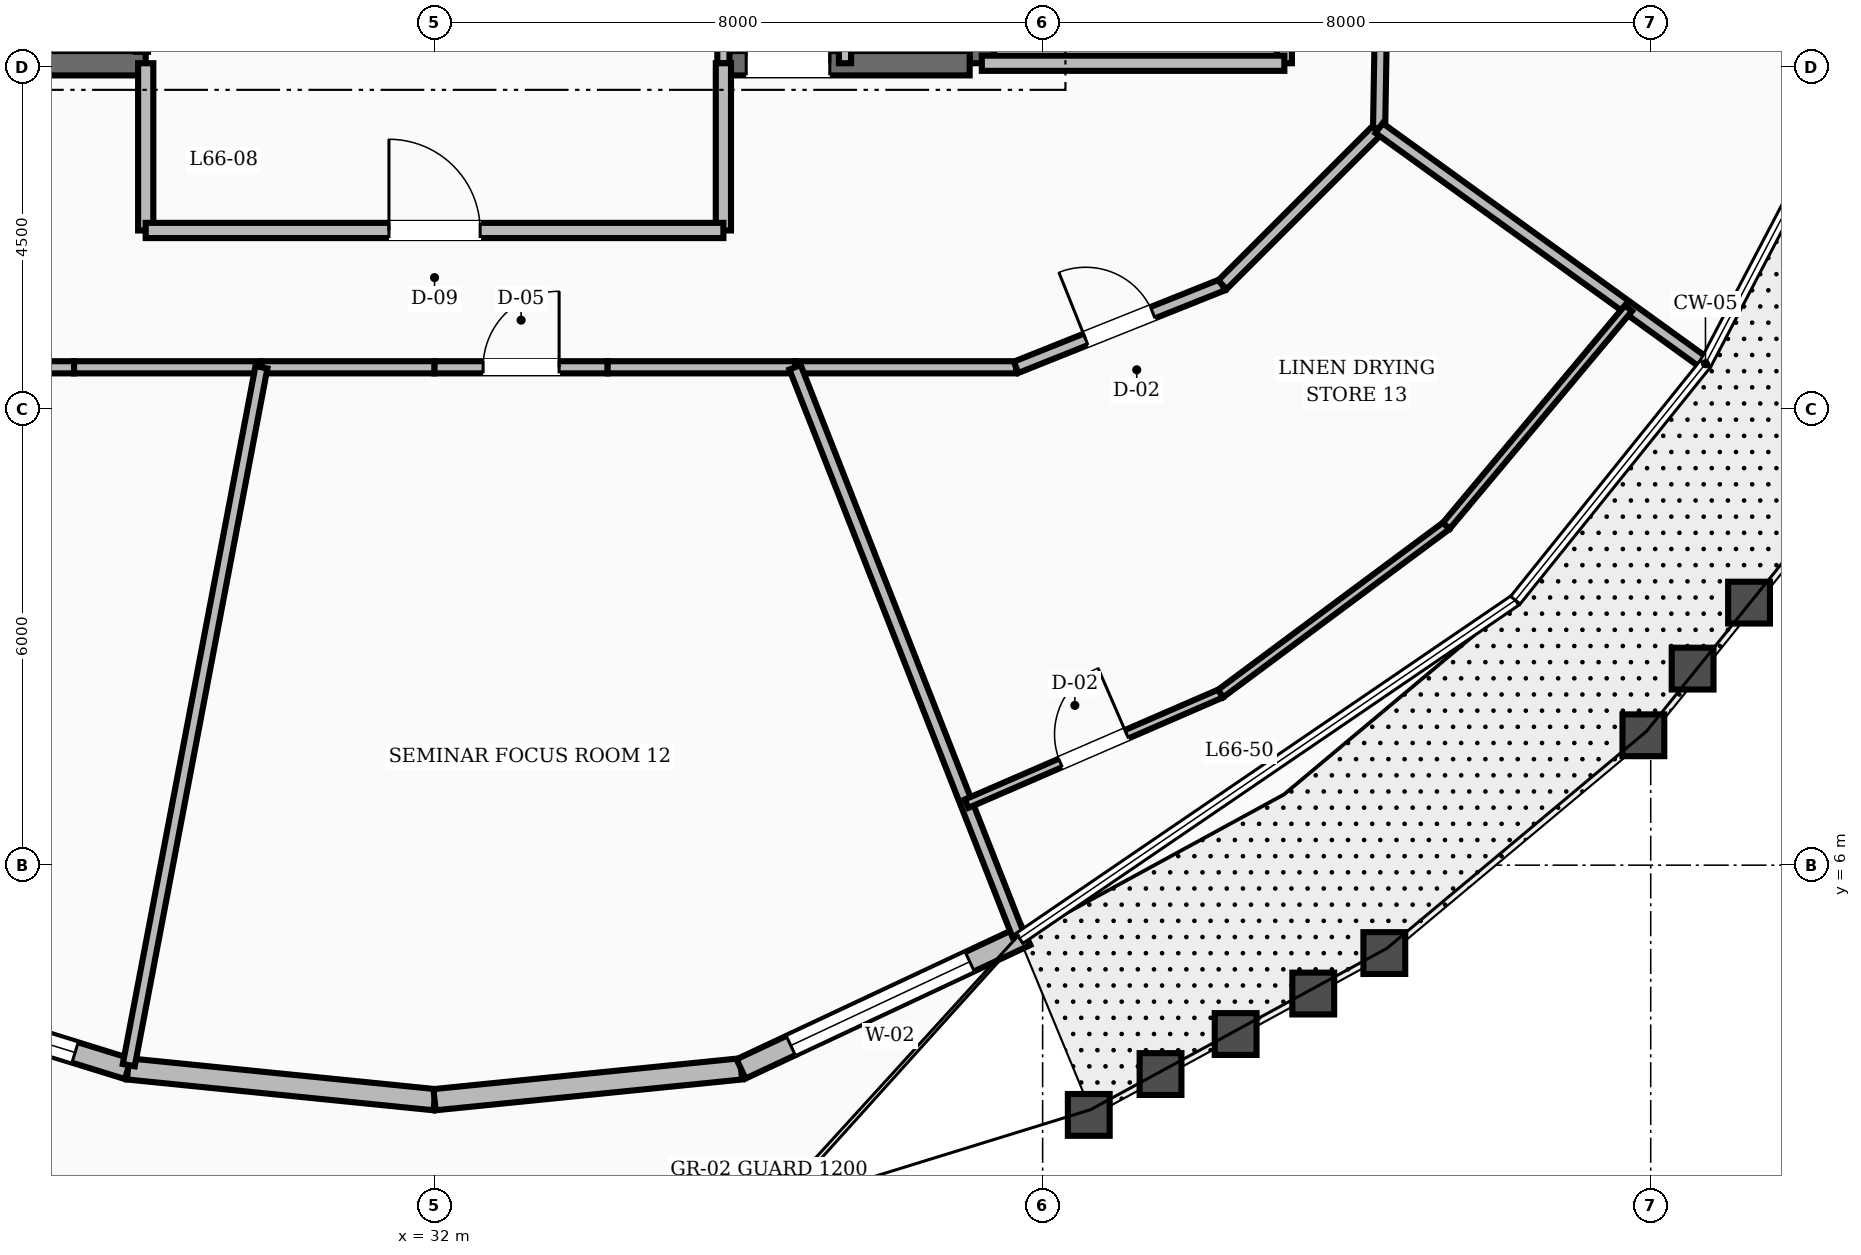
"""IFC4 building model, lengths in metres.
Left out: names, types, materials, properties, quantities, classifications, styles, units other than length and angle.
Written with IfcOpenShell. Run it as: python <this file> out.ifc"""

import sys

from ifc_helpers import new_model, si_unit, direction, frame, frame_2d, origin, place, context, subcontext, project, spatial, rectangle, extrude, element, fill, save


model = new_model("IFC4")
c1 = context("Model", 3, precision=1e-05, world=origin(), true_north=direction((0.0, 1.0)))
c2 = subcontext(c1, "Body", "Model", "MODEL_VIEW")
j1 = project(units=[si_unit("LENGTHUNIT", "METRE"), si_unit("PLANEANGLEUNIT", "RADIAN")], contexts=[c1])
p1 = place(None, origin())
s1 = spatial("IfcSite", under=j1, at=p1, CompositionType="ELEMENT")
p2 = place(p1, origin())
s2 = spatial("IfcBuilding", under=s1, at=p2, CompositionType="ELEMENT")
p3 = place(p2, frame((0.0, 0.0, 254.4)))
s3 = spatial("IfcBuildingStorey", under=s2, at=p3, CompositionType="ELEMENT", Elevation=254.4)
p4 = place(p3, frame((39.2, 16.55, 0.0), z_axis=(0.0, 0.0, 1.0), x_axis=(0.0, 1.0, 0.0)))
e1 = element("IfcWall", 1, at=p4, inside=s3, PredefinedType="SHEAR", context=c2, shape_type="SweptSolid", body=[
    extrude(rectangle(XDim=6.3, YDim=0.32, at=frame_2d((3.15, 0.0))), origin(), (0.0, 0.0, 1.0), 3.6),
])
p5 = place(p3, frame((24.96, 16.55, 0.0), z_axis=(0.0, 0.0, 1.0), x_axis=(1.0, 0.0, 0.0)))
e2 = element("IfcWall", 2, at=p5, inside=s3, PredefinedType="SHEAR", context=c2, shape_type="SweptSolid", body=[
    extrude(rectangle(XDim=3.24, YDim=0.32, at=frame_2d((1.62, 0.0))), origin(), (0.0, 0.0, 1.0), 3.6),
])
p6 = place(p3, frame((35.8, 16.55, 0.0), z_axis=(0.0, 0.0, 1.0), x_axis=(1.0, 0.0, 0.0)))
e3 = element("IfcWall", 3, at=p6, inside=s3, PredefinedType="SHEAR", context=c2, shape_type="SweptSolid", body=[
    extrude(rectangle(XDim=3.24, YDim=0.32, at=frame_2d((1.62, 0.0))), origin(), (0.0, 0.0, 1.0), 3.6),
])
p7 = place(p6, frame((0.3, 0.0, 0.0)))
e4 = element("IfcOpeningElement", 4, at=p7, cuts=e3, PredefinedType="OPENING", context=c2, shape_type="SweptSolid", body=[
    extrude(rectangle(XDim=1.1, YDim=2.1, at=frame_2d((0.55, 1.05))), frame((0.0, 0.17, 0.0), z_axis=(0.0, -1.0, 0.0), x_axis=(1.0, 0.0, 0.0)), (0.0, 0.0, 1.0), 0.34),
])
p8 = place(p3, frame((24.09, 4.52, 0.0), z_axis=(0.0, 0.0, 1.0), x_axis=(0.955300452464, -0.295636678243, 0.0)))
e5 = element("IfcWall", 5, at=p8, inside=s3, PredefinedType="STANDARD", context=c2, shape_type="SweptSolid", body=[
    extrude(rectangle(XDim=4.059, YDim=0.28, at=frame_2d((2.029, 0.0))), origin(), (0.0, 0.0, 1.0), 2.88),
])
p9 = place(p8, frame((0.729, 0.0, 0.8)))
e6 = element("IfcOpeningElement", 6, at=p9, cuts=e5, PredefinedType="OPENING", context=c2, shape_type="SweptSolid", body=[
    extrude(rectangle(XDim=2.6, YDim=1.65, at=frame_2d((1.3, 0.825))), frame((0.0, 0.15, 0.0), z_axis=(0.0, -1.0, 0.0), x_axis=(1.0, 0.0, 0.0)), (0.0, 0.0, 1.0), 0.3),
])
for number, where, z_axis, x_axis in (
    (7, (27.968, 3.32, 0.0), (0.0, 0.0, 1.0), (0.995, -0.1, 0.0)),
    (8, (32.0, 2.915, 0.0), (0.0, 0.0, 1.0), (0.995, 0.1, 0.0)),
):
    element("IfcWall", number, at=place(p3, frame(where, z_axis=z_axis, x_axis=x_axis)), inside=s3, PredefinedType="STANDARD", context=c2, shape_type="SweptSolid", body=[
        extrude(rectangle(XDim=4.053, YDim=0.28, at=frame_2d((2.026, 0.0))), origin(), (0.0, 0.0, 1.0), 2.88),
    ])
p10 = place(p3, frame((36.032, 3.32, 0.0), z_axis=(0.0, 0.0, 1.0), x_axis=(0.905435549798, 0.424483763131, 0.0)))
e9 = element("IfcWall", 9, at=p10, inside=s3, PredefinedType="STANDARD", context=c2, shape_type="SweptSolid", body=[
    extrude(rectangle(XDim=4.138, YDim=0.28, at=frame_2d((2.069, 0.0))), origin(), (0.0, 0.0, 1.0), 2.88),
])
p11 = place(p10, frame((0.723, 0.0, 0.8)))
e10 = element("IfcOpeningElement", 10, at=p11, cuts=e9, PredefinedType="OPENING", context=c2, shape_type="SweptSolid", body=[
    extrude(rectangle(XDim=2.6, YDim=1.65, at=frame_2d((1.3, 0.825))), frame((0.0, 0.15, 0.0), z_axis=(0.0, -1.0, 0.0), x_axis=(1.0, 0.0, 0.0)), (0.0, 0.0, 1.0), 0.3),
])
p12 = place(p3, frame((43.18, 16.55, 0.0), z_axis=(0.0, 0.0, 1.0), x_axis=(0.0, 1.0, 0.0)))
e11 = element("IfcWall", 11, at=p12, inside=s3, PredefinedType="SOLIDWALL", context=c2, shape_type="SweptSolid", body=[
    extrude(rectangle(XDim=2.73, YDim=0.2, at=frame_2d((1.365, 0.0))), origin(), (0.0, 0.0, 1.0), 2.87),
])
p13 = place(p12, frame((0.89, 0.0, 0.0)))
e12 = element("IfcOpeningElement", 12, at=p13, cuts=e11, PredefinedType="OPENING", context=c2, shape_type="SweptSolid", body=[
    extrude(rectangle(XDim=0.95, YDim=2.1, at=frame_2d((0.475, 1.05))), frame((0.0, 0.11, 0.0), z_axis=(0.0, -1.0, 0.0), x_axis=(1.0, 0.0, 0.0)), (0.0, 0.0, 1.0), 0.22),
])
p14 = place(p3, frame((39.2, 16.55, 0.0), z_axis=(0.0, 0.0, 1.0), x_axis=(1.0, 0.0, 0.0)))
e13 = element("IfcWall", 13, at=p14, inside=s3, PredefinedType="SOLIDWALL", context=c2, shape_type="SweptSolid", body=[
    extrude(rectangle(XDim=3.98, YDim=0.2, at=frame_2d((1.99, 0.0))), origin(), (0.0, 0.0, 1.0), 2.87),
])
p15 = place(p3, frame((35.8, 16.55, 0.0), z_axis=(0.0, 0.0, 1.0), x_axis=(0.0, 1.0, 0.0)))
e14 = element("IfcWall", 14, at=p15, inside=s3, PredefinedType="SOLIDWALL", context=c2, shape_type="SweptSolid", body=[
    extrude(rectangle(XDim=3.3, YDim=0.16, at=frame_2d((1.65, 0.0))), origin(), (0.0, 0.0, 1.0), 2.87),
])
p16 = place(p3, frame((37.4, 16.55, 0.0), z_axis=(0.0, 0.0, 1.0), x_axis=(0.0, 1.0, 0.0)))
e15 = element("IfcWall", 15, at=p16, inside=s3, PredefinedType="SOLIDWALL", context=c2, shape_type="SweptSolid", body=[
    extrude(rectangle(XDim=1.75, YDim=0.16, at=frame_2d((0.875, 0.0))), origin(), (0.0, 0.0, 1.0), 2.87),
])
for number, where, z_axis, x_axis in (
    (16, (28.2, 14.35, 0.0), (0.0, 0.0, 1.0), (0.0, 1.0, 0.0)),
    (17, (35.8, 14.35, 0.0), (0.0, 0.0, 1.0), (0.0, 1.0, 0.0)),
):
    element("IfcWall", number, at=place(p3, frame(where, z_axis=z_axis, x_axis=x_axis)), inside=s3, PredefinedType="SOLIDWALL", context=c2, shape_type="SweptSolid", body=[
        extrude(rectangle(XDim=2.2, YDim=0.2, at=frame_2d((1.1, 0.0))), origin(), (0.0, 0.0, 1.0), 2.87),
    ])
p17 = place(p3, frame((28.2, 14.35, 0.0), z_axis=(0.0, 0.0, 1.0), x_axis=(1.0, 0.0, 0.0)))
e18 = element("IfcWall", 18, at=p17, inside=s3, PredefinedType="SOLIDWALL", context=c2, shape_type="SweptSolid", body=[
    extrude(rectangle(XDim=7.6, YDim=0.2, at=frame_2d((3.8, 0.0))), origin(), (0.0, 0.0, 1.0), 2.87),
])
p18 = place(p17, frame((3.2, 0.0, 0.0)))
e19 = element("IfcOpeningElement", 19, at=p18, cuts=e18, PredefinedType="OPENING", context=c2, shape_type="SweptSolid", body=[
    extrude(rectangle(XDim=1.2, YDim=2.1, at=frame_2d((0.6, 1.05))), frame((0.0, 0.11, 0.0), z_axis=(0.0, -1.0, 0.0), x_axis=(1.0, 0.0, 0.0)), (0.0, 0.0, 1.0), 0.22),
])
p19 = place(p3, frame((24.349, 12.55, 0.0), z_axis=(0.0, 0.0, 1.0), x_axis=(1.0, 0.0, 0.0)))
e20 = element("IfcWall", 20, at=p19, inside=s3, PredefinedType="SOLIDWALL", context=c2, shape_type="SweptSolid", body=[
    extrude(rectangle(XDim=2.908, YDim=0.16, at=frame_2d((1.454, 0.0))), origin(), (0.0, 0.0, 1.0), 2.87),
])
p20 = place(p19, frame((0.954, 0.0, 0.0)))
e21 = element("IfcOpeningElement", 21, at=p20, cuts=e20, PredefinedType="OPENING", context=c2, shape_type="SweptSolid", body=[
    extrude(rectangle(XDim=1.0, YDim=2.1, at=frame_2d((0.5, 1.05))), frame((0.0, 0.09, 0.0), z_axis=(0.0, -1.0, 0.0), x_axis=(1.0, 0.0, 0.0)), (0.0, 0.0, 1.0), 0.18),
])
p21 = place(p3, frame((27.257, 12.55, 0.0), z_axis=(0.0, 0.0, 1.0), x_axis=(1.0, 0.0, 0.0)))
e22 = element("IfcWall", 22, at=p21, inside=s3, PredefinedType="SOLIDWALL", context=c2, shape_type="SweptSolid", body=[
    extrude(rectangle(XDim=2.465, YDim=0.16, at=frame_2d((1.232, 0.0))), origin(), (0.0, 0.0, 1.0), 2.87),
])
p22 = place(p3, frame((29.722, 12.55, 0.0), z_axis=(0.0, 0.0, 1.0), x_axis=(1.0, 0.0, 0.0)))
e23 = element("IfcWall", 23, at=p22, inside=s3, PredefinedType="SOLIDWALL", context=c2, shape_type="SweptSolid", body=[
    extrude(rectangle(XDim=2.278, YDim=0.16, at=frame_2d((1.139, 0.0))), origin(), (0.0, 0.0, 1.0), 2.87),
])
p23 = place(p3, frame((32.0, 12.55, 0.0), z_axis=(0.0, 0.0, 1.0), x_axis=(1.0, 0.0, 0.0)))
e24 = element("IfcWall", 24, at=p23, inside=s3, PredefinedType="SOLIDWALL", context=c2, shape_type="SweptSolid", body=[
    extrude(rectangle(XDim=2.278, YDim=0.16, at=frame_2d((1.139, 0.0))), origin(), (0.0, 0.0, 1.0), 2.87),
])
p24 = place(p23, frame((0.639, 0.0, 0.0)))
e25 = element("IfcOpeningElement", 25, at=p24, cuts=e24, PredefinedType="OPENING", context=c2, shape_type="SweptSolid", body=[
    extrude(rectangle(XDim=1.0, YDim=2.1, at=frame_2d((0.5, 1.05))), frame((0.0, 0.09, 0.0), z_axis=(0.0, -1.0, 0.0), x_axis=(1.0, 0.0, 0.0)), (0.0, 0.0, 1.0), 0.18),
])
p25 = place(p3, frame((34.278, 12.55, 0.0), z_axis=(0.0, 0.0, 1.0), x_axis=(1.0, 0.0, 0.0)))
e26 = element("IfcWall", 26, at=p25, inside=s3, PredefinedType="SOLIDWALL", context=c2, shape_type="SweptSolid", body=[
    extrude(rectangle(XDim=2.465, YDim=0.16, at=frame_2d((1.232, 0.0))), origin(), (0.0, 0.0, 1.0), 2.87),
])
p26 = place(p3, frame((36.743, 12.55, 0.0), z_axis=(0.0, 0.0, 1.0), x_axis=(1.0, 0.0, 0.0)))
e27 = element("IfcWall", 27, at=p26, inside=s3, PredefinedType="SOLIDWALL", context=c2, shape_type="SweptSolid", body=[
    extrude(rectangle(XDim=2.908, YDim=0.16, at=frame_2d((1.454, 0.0))), origin(), (0.0, 0.0, 1.0), 2.87),
])
p27 = place(p3, frame((39.651, 12.55, 0.0), z_axis=(0.0, 0.0, 1.0), x_axis=(0.92856882165, 0.371160266542, 0.0)))
e28 = element("IfcWall", 28, at=p27, inside=s3, PredefinedType="SOLIDWALL", context=c2, shape_type="SweptSolid", body=[
    extrude(rectangle(XDim=2.923, YDim=0.16, at=frame_2d((1.461, 0.0))), origin(), (0.0, 0.0, 1.0), 2.87),
])
p28 = place(p27, frame((0.987, 0.0, 0.0)))
e29 = element("IfcOpeningElement", 29, at=p28, cuts=e28, PredefinedType="OPENING", context=c2, shape_type="SweptSolid", body=[
    extrude(rectangle(XDim=0.95, YDim=2.1, at=frame_2d((0.475, 1.05))), frame((0.0, 0.09, 0.0), z_axis=(0.0, -1.0, 0.0), x_axis=(1.0, 0.0, 0.0)), (0.0, 0.0, 1.0), 0.18),
])
p29 = place(p3, frame((42.365, 13.635, 0.0), z_axis=(0.0, 0.0, 1.0), x_axis=(0.707106781187, 0.707106781187, 0.0)))
e30 = element("IfcWall", 30, at=p29, inside=s3, PredefinedType="SOLIDWALL", context=c2, shape_type="SweptSolid", body=[
    extrude(rectangle(XDim=2.916, YDim=0.16, at=frame_2d((1.458, 0.0))), origin(), (0.0, 0.0, 1.0), 2.87),
])
p30 = place(p3, frame((44.427, 15.697, 0.0), z_axis=(0.0, 0.0, 1.0), x_axis=(0.016981035134, 0.999855811828, 0.0)))
e31 = element("IfcWall", 31, at=p30, inside=s3, PredefinedType="SOLIDWALL", context=c2, shape_type="SweptSolid", body=[
    extrude(rectangle(XDim=3.134, YDim=0.16, at=frame_2d((1.567, 0.0))), origin(), (0.0, 0.0, 1.0), 2.87),
])
p31 = place(p3, frame((44.427, 15.697, 0.0), z_axis=(0.0, 0.0, 1.0), x_axis=(0.810763897191, -0.585373302271, 0.0)))
e32 = element("IfcWall", 32, at=p31, inside=s3, PredefinedType="SOLIDWALL", context=c2, shape_type="SweptSolid", body=[
    extrude(rectangle(XDim=5.246, YDim=0.16, at=frame_2d((2.623, 0.0))), origin(), (0.0, 0.0, 1.0), 2.87),
])
p32 = place(p3, frame((29.722, 12.55, 0.0), z_axis=(0.0, 0.0, 1.0), x_axis=(-0.186783181111, -0.982401162079, 0.0)))
e33 = element("IfcWall", 33, at=p32, inside=s3, PredefinedType="SOLIDWALL", context=c2, shape_type="SweptSolid", body=[
    extrude(rectangle(XDim=9.346, YDim=0.16, at=frame_2d((4.673, 0.0))), origin(), (0.0, 0.0, 1.0), 2.87),
])
p33 = place(p3, frame((36.743, 12.55, 0.0), z_axis=(0.0, 0.0, 1.0), x_axis=(0.365790774428, -0.930697109345, 0.0)))
e34 = element("IfcWall", 34, at=p33, inside=s3, PredefinedType="SOLIDWALL", context=c2, shape_type="SweptSolid", body=[
    extrude(rectangle(XDim=8.022, YDim=0.16, at=frame_2d((4.011, 0.0))), origin(), (0.0, 0.0, 1.0), 2.87),
])
p34 = place(p3, frame((38.999, 6.809, 0.0), z_axis=(0.0, 0.0, 1.0), x_axis=(0.917427639105, 0.397902660215, 0.0)))
e35 = element("IfcWall", 35, at=p34, inside=s3, PredefinedType="PARTITIONING", context=c2, shape_type="SweptSolid", body=[
    extrude(rectangle(XDim=3.643, YDim=0.12, at=frame_2d((1.822, 0.0))), origin(), (0.0, 0.0, 1.0), 2.87),
])
p35 = place(p34, frame((1.347, 0.0, 0.0)))
e36 = element("IfcOpeningElement", 36, at=p35, cuts=e35, PredefinedType="OPENING", context=c2, shape_type="SweptSolid", body=[
    extrude(rectangle(XDim=0.95, YDim=2.1, at=frame_2d((0.475, 1.05))), frame((0.0, 0.07, 0.0), z_axis=(0.0, -1.0, 0.0), x_axis=(1.0, 0.0, 0.0)), (0.0, 0.0, 1.0), 0.14),
])
p36 = place(p3, frame((42.342, 8.258, 0.0), z_axis=(0.0, 0.0, 1.0), x_axis=(0.802621959604, 0.596488046788, 0.0)))
e37 = element("IfcWall", 37, at=p36, inside=s3, PredefinedType="PARTITIONING", context=c2, shape_type="SweptSolid", body=[
    extrude(rectangle(XDim=3.699, YDim=0.12, at=frame_2d((1.849, 0.0))), origin(), (0.0, 0.0, 1.0), 2.87),
])
p37 = place(p3, frame((45.311, 10.465, 0.0), z_axis=(0.0, 0.0, 1.0), x_axis=(0.642015314971, 0.766691812492, 0.0)))
e38 = element("IfcWall", 38, at=p37, inside=s3, PredefinedType="PARTITIONING", context=c2, shape_type="SweptSolid", body=[
    extrude(rectangle(XDim=3.734, YDim=0.12, at=frame_2d((1.867, 0.0))), origin(), (0.0, 0.0, 1.0), 2.87),
])
p38 = place(p9, origin())
e39 = element("IfcWindow", 39, at=p38, inside=s3, PartitioningType="SINGLE_PANEL", PredefinedType="WINDOW", context=c2, shape_type="SweptSolid", body=[
    extrude(rectangle(XDim=2.6, YDim=1.65, at=frame_2d((1.3, 0.825))), frame((0.0, 0.03, 0.0), z_axis=(0.0, -1.0, 0.0), x_axis=(1.0, 0.0, 0.0)), (0.0, 0.0, 1.0), 0.06),
])
fill(e6, e39)
p39 = place(p11, origin())
e40 = element("IfcWindow", 40, at=p39, inside=s3, PartitioningType="SINGLE_PANEL", PredefinedType="WINDOW", context=c2, shape_type="SweptSolid", body=[
    extrude(rectangle(XDim=2.6, YDim=1.65, at=frame_2d((1.3, 0.825))), frame((0.0, 0.03, 0.0), z_axis=(0.0, -1.0, 0.0), x_axis=(1.0, 0.0, 0.0)), (0.0, 0.0, 1.0), 0.06),
])
fill(e10, e40)
p40 = place(p7, origin())
e41 = element("IfcDoor", 41, at=p40, inside=s3, OperationType="SINGLE_SWING_RIGHT", PredefinedType="DOOR", context=c2, shape_type="SweptSolid", body=[
    extrude(rectangle(XDim=1.1, YDim=2.1, at=frame_2d((0.55, 1.05))), frame((0.0, 0.025, 0.0), z_axis=(0.0, -1.0, 0.0), x_axis=(1.0, 0.0, 0.0)), (0.0, 0.0, 1.0), 0.05),
])
fill(e4, e41)
p41 = place(p18, origin())
e42 = element("IfcDoor", 42, at=p41, inside=s3, OperationType="SINGLE_SWING_LEFT", PredefinedType="DOOR", context=c2, shape_type="SweptSolid", body=[
    extrude(rectangle(XDim=1.2, YDim=2.1, at=frame_2d((0.6, 1.05))), frame((0.0, 0.025, 0.0), z_axis=(0.0, -1.0, 0.0), x_axis=(1.0, 0.0, 0.0)), (0.0, 0.0, 1.0), 0.05),
])
fill(e19, e42)
p42 = place(p24, origin())
e43 = element("IfcDoor", 43, at=p42, inside=s3, OperationType="SINGLE_SWING_RIGHT", PredefinedType="DOOR", context=c2, shape_type="SweptSolid", body=[
    extrude(rectangle(XDim=1.0, YDim=2.1, at=frame_2d((0.5, 1.05))), frame((0.0, 0.025, 0.0), z_axis=(0.0, -1.0, 0.0), x_axis=(1.0, 0.0, 0.0)), (0.0, 0.0, 1.0), 0.05),
])
fill(e25, e43)
p43 = place(p28, origin())
e44 = element("IfcDoor", 44, at=p43, inside=s3, OperationType="SINGLE_SWING_LEFT", PredefinedType="DOOR", context=c2, shape_type="SweptSolid", body=[
    extrude(rectangle(XDim=0.95, YDim=2.1, at=frame_2d((0.475, 1.05))), frame((0.0, 0.025, 0.0), z_axis=(0.0, -1.0, 0.0), x_axis=(1.0, 0.0, 0.0)), (0.0, 0.0, 1.0), 0.05),
])
fill(e29, e44)
p44 = place(p35, origin())
e45 = element("IfcDoor", 45, at=p44, inside=s3, OperationType="SINGLE_SWING_RIGHT", PredefinedType="DOOR", context=c2, shape_type="SweptSolid", body=[
    extrude(rectangle(XDim=0.95, YDim=2.1, at=frame_2d((0.475, 1.05))), frame((0.0, 0.025, 0.0), z_axis=(0.0, -1.0, 0.0), x_axis=(1.0, 0.0, 0.0)), (0.0, 0.0, 1.0), 0.05),
])
fill(e36, e45)
save(model, sys.argv[1])
